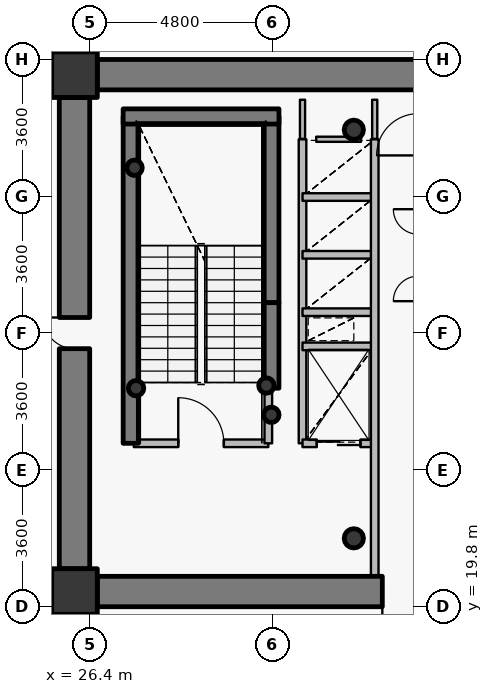
"""IFC4 building model, lengths in metres.
Left out: names, types, materials, properties, quantities, classifications, styles, units other than length and angle.
Written with IfcOpenShell. Run it as: python <this file> out.ifc"""

import sys

from ifc_helpers import new_model, si_unit, direction, frame, frame_2d, origin, origin_2d, place, context, subcontext, project, spatial, rectangle, hollow_circle, extrude, source, transform, mapped, element, fill, save


model = new_model("IFC4")
c1 = context("Model", 3, precision=1e-05, world=origin(), true_north=direction((0.0, 1.0)))
c2 = subcontext(c1, "Body", "Model", "MODEL_VIEW")
j1 = project(units=[si_unit("LENGTHUNIT", "METRE"), si_unit("PLANEANGLEUNIT", "RADIAN")], contexts=[c1])
p1 = place(None, origin())
s1 = spatial("IfcSite", under=j1, at=p1, CompositionType="ELEMENT")
p2 = place(p1, origin())
s2 = spatial("IfcBuilding", under=s1, at=p2, CompositionType="ELEMENT")
p3 = place(p2, frame((0.0, 0.0, 97.2)))
s3 = spatial("IfcBuildingStorey", under=s2, at=p3, CompositionType="ELEMENT", Elevation=97.2)
for number, where, z_axis, x_axis in (
    (1, (26.0, 20.2, 0.0), (0.0, 0.0, 1.0), (1.0, 0.0, 0.0)),
    (2, (26.0, 33.8, 0.0), (0.0, 0.0, 1.0), (1.0, 0.0, 0.0)),
):
    element("IfcColumn", number, at=place(p3, frame(where, z_axis=z_axis, x_axis=x_axis)), inside=s3, PredefinedType="COLUMN", context=c2, shape_type="SweptSolid", body=[
        extrude(rectangle(XDim=1.2, YDim=1.2, at=origin_2d()), origin(), (0.0, 0.0, 1.0), 3.75),
    ])
for number, where, z_axis, x_axis in (
    (3, (33.35, 21.6, 0.0), (0.0, 0.0, 1.0), (1.0, 0.0, 0.0)),
    (4, (33.35, 32.35, 0.0), (0.0, 0.0, 1.0), (1.0, 0.0, 0.0)),
):
    element("IfcColumn", number, at=place(p3, frame(where, z_axis=z_axis, x_axis=x_axis)), inside=s3, PredefinedType="COLUMN", context=c2, shape_type="SweptSolid", body=[
        extrude(hollow_circle(Radius=0.254, WallThickness=0.02, at=origin_2d()), origin(), (0.0, 0.0, 1.0), 3.75),
    ])
p4 = place(p3, frame((27.48, 24.1, 0.0), z_axis=(0.0, 0.0, 1.0), x_axis=(0.0, 1.0, 0.0)))
e5 = element("IfcWall", 5, at=p4, inside=s3, PredefinedType="SHEAR", context=c2, shape_type="SweptSolid", body=[
    extrude(rectangle(XDim=8.6, YDim=0.4, at=frame_2d((4.3, 0.0))), origin(), (0.0, 0.0, 1.0), 3.75),
])
p5 = place(p3, frame((31.18, 27.8, 0.0), z_axis=(0.0, 0.0, 1.0), x_axis=(0.0, 1.0, 0.0)))
e6 = element("IfcWall", 6, at=p5, inside=s3, PredefinedType="SHEAR", context=c2, shape_type="SweptSolid", body=[
    extrude(rectangle(XDim=4.9, YDim=0.4, at=frame_2d((2.45, 0.0))), origin(), (0.0, 0.0, 1.0), 3.75),
])
p6 = place(p3, frame((27.28, 32.7, 0.0), z_axis=(0.0, 0.0, 1.0), x_axis=(1.0, 0.0, 0.0)))
e7 = element("IfcWall", 7, at=p6, inside=s3, PredefinedType="SHEAR", context=c2, shape_type="SweptSolid", body=[
    extrude(rectangle(XDim=4.1, YDim=0.4, at=frame_2d((2.05, 0.0))), origin(), (0.0, 0.0, 1.0), 3.75),
])
for number, where, z_axis, x_axis in (
    (8, (27.58, 31.35, 0.0), (0.0, 0.0, 1.0), (1.0, 0.0, 0.0)),
    (9, (31.05, 25.62, 0.0), (0.0, 0.0, 1.0), (1.0, 0.0, 0.0)),
    (10, (31.18, 24.85, 0.0), (0.0, 0.0, 1.0), (1.0, 0.0, 0.0)),
    (11, (27.62, 25.55, 0.0), (0.0, 0.0, 1.0), (1.0, 0.0, 0.0)),
):
    element("IfcColumn", number, at=place(p3, frame(where, z_axis=z_axis, x_axis=x_axis)), inside=s3, PredefinedType="COLUMN", context=c2, shape_type="SweptSolid", body=[
        extrude(hollow_circle(Radius=0.203, WallThickness=0.016, at=origin_2d()), origin(), (0.0, 0.0, 1.0), 3.75),
    ])
p7 = place(p3, frame((26.6, 33.8, 0.0), z_axis=(0.0, 0.0, 1.0), x_axis=(1.0, 0.0, 0.0)))
e12 = element("IfcWall", 12, at=p7, inside=s3, PredefinedType="SHEAR", context=c2, shape_type="SweptSolid", body=[
    extrude(rectangle(XDim=18.8, YDim=0.8, at=frame_2d((9.4, 0.0))), origin(), (0.0, 0.0, 1.0), 2.95),
])
p8 = place(p3, frame((45.4, 20.2, 0.0), z_axis=(0.0, 0.0, 1.0), x_axis=(-1.0, 0.0, 0.0)))
e13 = element("IfcWall", 13, at=p8, inside=s3, PredefinedType="SHEAR", context=c2, shape_type="SweptSolid", body=[
    extrude(rectangle(XDim=18.8, YDim=0.8, at=frame_2d((9.4, 0.0))), origin(), (0.0, 0.0, 1.0), 2.95),
])
p9 = place(p8, frame((10.15, 0.0, 0.0)))
e14 = element("IfcOpeningElement", 14, at=p9, cuts=e13, PredefinedType="OPENING", context=c2, shape_type="SweptSolid", body=[
    extrude(rectangle(XDim=1.15, YDim=2.15, at=origin_2d()), frame((0.575, 0.41, 1.075), z_axis=(0.0, -1.0, 0.0), x_axis=(1.0, 0.0, 0.0)), (0.0, 0.0, 1.0), 0.82),
])
p10 = place(p3, frame((26.0, 20.8, 0.0), z_axis=(0.0, 0.0, 1.0), x_axis=(0.0, 1.0, 0.0)))
e15 = element("IfcWall", 15, at=p10, inside=s3, PredefinedType="SHEAR", context=c2, shape_type="SweptSolid", body=[
    extrude(rectangle(XDim=12.4, YDim=0.8, at=frame_2d((6.2, 0.0))), origin(), (0.0, 0.0, 1.0), 2.95),
])
p11 = place(p10, frame((5.79, 0.0, 0.0)))
e16 = element("IfcOpeningElement", 16, at=p11, cuts=e15, PredefinedType="OPENING", context=c2, shape_type="SweptSolid", body=[
    extrude(rectangle(XDim=0.82, YDim=2.1, at=origin_2d()), frame((0.41, 0.41, 1.05), z_axis=(0.0, -1.0, 0.0), x_axis=(1.0, 0.0, 0.0)), (0.0, 0.0, 1.0), 0.82),
])
p12 = place(p3, frame((31.18, 25.55, 0.0), z_axis=(0.0, 0.0, 1.0), x_axis=(0.0, 1.0, 0.0)))
e17 = element("IfcWall", 17, at=p12, inside=s3, PredefinedType="SHEAR", context=c2, shape_type="SweptSolid", body=[
    extrude(rectangle(XDim=2.25, YDim=0.4, at=frame_2d((1.125, 0.0))), origin(), (0.0, 0.0, 1.0), 3.1),
])
p13 = place(p3, frame((27.56, 24.1, 0.0), z_axis=(0.0, 0.0, 1.0), x_axis=(1.0, 0.0, 0.0)))
e18 = element("IfcWall", 18, at=p13, inside=s3, PredefinedType="PARTITIONING", context=c2, shape_type="SweptSolid", body=[
    extrude(rectangle(XDim=3.54, YDim=0.2, at=frame_2d((1.77, 0.0))), origin(), (0.0, 0.0, 1.0), 3.5),
])
p14 = place(p13, frame((1.17, 0.0, 0.0)))
e19 = element("IfcOpeningElement", 19, at=p14, cuts=e18, PredefinedType="OPENING", context=c2, shape_type="SweptSolid", body=[
    extrude(rectangle(XDim=1.2, YDim=2.15, at=origin_2d()), frame((0.6, 0.11, 1.075), z_axis=(0.0, -1.0, 0.0), x_axis=(1.0, 0.0, 0.0)), (0.0, 0.0, 1.0), 0.22),
])
p15 = place(p3, frame((31.1, 24.1, 0.0), z_axis=(0.0, 0.0, 1.0), x_axis=(0.0, 1.0, 0.0)))
e20 = element("IfcWall", 20, at=p15, inside=s3, PredefinedType="PARTITIONING", context=c2, shape_type="SweptSolid", body=[
    extrude(rectangle(XDim=1.44, YDim=0.2, at=frame_2d((0.72, 0.0))), origin(), (0.0, 0.0, 1.0), 3.5),
])
p16 = place(p3, frame((32.0, 24.1, 0.0), z_axis=(0.0, 0.0, 1.0), x_axis=(0.0, 1.0, 0.0)))
e21 = element("IfcWall", 21, at=p16, inside=s3, PredefinedType="PARTITIONING", context=c2, shape_type="SweptSolid", body=[
    extrude(rectangle(XDim=8.0, YDim=0.2, at=frame_2d((4.0, 0.0))), origin(), (0.0, 0.0, 1.0), 3.5),
])
p17 = place(p3, frame((32.0, 24.1, 0.0), z_axis=(0.0, 0.0, 1.0), x_axis=(1.0, 0.0, 0.0)))
e22 = element("IfcWall", 22, at=p17, inside=s3, PredefinedType="PARTITIONING", context=c2, shape_type="SweptSolid", body=[
    extrude(rectangle(XDim=1.9, YDim=0.2, at=frame_2d((0.95, 0.0))), origin(), (0.0, 0.0, 1.0), 3.085),
])
p18 = place(p17, frame((0.375, 0.0, 0.0)))
e23 = element("IfcOpeningElement", 23, at=p18, cuts=e22, PredefinedType="OPENING", context=c2, shape_type="SweptSolid", body=[
    extrude(rectangle(XDim=1.15, YDim=2.15, at=origin_2d()), frame((0.575, 0.11, 1.075), z_axis=(0.0, -1.0, 0.0), x_axis=(1.0, 0.0, 0.0)), (0.0, 0.0, 1.0), 0.22),
])
for number, where, z_axis, x_axis in (
    (24, (32.0, 26.65, 0.0), (0.0, 0.0, 1.0), (1.0, 0.0, 0.0)),
    (25, (32.0, 27.55, 0.0), (0.0, 0.0, 1.0), (1.0, 0.0, 0.0)),
    (26, (32.0, 29.06, 0.0), (0.0, 0.0, 1.0), (1.0, 0.0, 0.0)),
    (27, (32.0, 30.58, 0.0), (0.0, 0.0, 1.0), (1.0, 0.0, 0.0)),
):
    element("IfcWall", number, at=place(p3, frame(where, z_axis=z_axis, x_axis=x_axis)), inside=s3, PredefinedType="PARTITIONING", context=c2, shape_type="SweptSolid", body=[
        extrude(rectangle(XDim=1.9, YDim=0.2, at=frame_2d((0.95, 0.0))), origin(), (0.0, 0.0, 1.0), 3.085),
    ])
p19 = place(p3, frame((33.9, 20.6, 0.0), z_axis=(0.0, 0.0, 1.0), x_axis=(0.0, 1.0, 0.0)))
e28 = element("IfcWall", 28, at=p19, inside=s3, PredefinedType="PARTITIONING", context=c2, shape_type="SweptSolid", body=[
    extrude(rectangle(XDim=11.5, YDim=0.2, at=frame_2d((5.75, 0.0))), origin(), (0.0, 0.0, 1.0), 3.085),
])
p20 = place(p3, frame((32.36, 32.1, 0.0), z_axis=(0.0, 0.0, 1.0), x_axis=(1.0, 0.0, 0.0)))
e29 = element("IfcWall", 29, at=p20, inside=s3, PredefinedType="PARTITIONING", context=c2, shape_type="SweptSolid", body=[
    extrude(rectangle(XDim=1.18, YDim=0.135, at=frame_2d((0.59, 0.0))), origin(), (0.0, 0.0, 1.0), 3.085),
])
p21 = place(p3, frame((32.0, 33.14, 0.0), z_axis=(0.0, 0.0, 1.0), x_axis=(0.0, -1.0, 0.0)))
e30 = element("IfcWall", 30, at=p21, inside=s3, PredefinedType="PARTITIONING", context=c2, shape_type="SweptSolid", body=[
    extrude(rectangle(XDim=1.03, YDim=0.135, at=frame_2d((0.515, 0.0))), origin(), (0.0, 0.0, 1.0), 3.035),
])
p22 = place(p3, frame((33.9, 32.11, 0.0), z_axis=(0.0, 0.0, 1.0), x_axis=(0.0, 1.0, 0.0)))
e31 = element("IfcWall", 31, at=p22, inside=s3, PredefinedType="PARTITIONING", context=c2, shape_type="SweptSolid", body=[
    extrude(rectangle(XDim=1.03, YDim=0.135, at=frame_2d((0.515, 0.0))), origin(), (0.0, 0.0, 1.0), 3.085),
])
p23 = place(p3, frame((26.59, 34.2, 0.0), z_axis=(0.0, 0.0, 1.0), x_axis=(-1.0, 0.0, 0.0)))
e32 = element("IfcWall", 32, at=p23, inside=s3, PredefinedType="PARTITIONING", context=c2, shape_type="SweptSolid", body=[
    extrude(rectangle(XDim=0.99, YDim=0.135, at=frame_2d((0.495, 0.0))), origin(), (0.0, 0.0, 1.0), 2.935),
])
p24 = place(p3, frame((25.6, 33.893, 0.0), z_axis=(0.0, 0.0, 1.0), x_axis=(0.0, -1.0, 0.0)))
e33 = element("IfcWall", 33, at=p24, inside=s3, PredefinedType="PARTITIONING", context=c2, shape_type="SweptSolid", body=[
    extrude(rectangle(XDim=0.683, YDim=0.135, at=frame_2d((0.341, 0.0))), origin(), (0.0, 0.0, 1.0), 3.5),
])
p25 = place(p3, frame((25.6, 20.79, 0.0), z_axis=(0.0, 0.0, 1.0), x_axis=(0.0, -1.0, 0.0)))
e34 = element("IfcWall", 34, at=p25, inside=s3, PredefinedType="PARTITIONING", context=c2, shape_type="SweptSolid", body=[
    extrude(rectangle(XDim=0.99, YDim=0.135, at=frame_2d((0.495, 0.0))), origin(), (0.0, 0.0, 1.0), 3.5),
])
p26 = place(p3, frame((25.907, 19.8, 0.0), z_axis=(0.0, 0.0, 1.0), x_axis=(1.0, 0.0, 0.0)))
e35 = element("IfcWall", 35, at=p26, inside=s3, PredefinedType="PARTITIONING", context=c2, shape_type="SweptSolid", body=[
    extrude(rectangle(XDim=0.683, YDim=0.135, at=frame_2d((0.341, 0.0))), origin(), (0.0, 0.0, 1.0), 2.935),
])
m1 = source(origin(), c2, "Body", "SweptSolid", [
    extrude(rectangle(XDim=0.82, YDim=2.1, at=origin_2d()), frame((0.41, 0.025, 1.05), z_axis=(0.0, -1.0, 0.0), x_axis=(1.0, 0.0, 0.0)), (0.0, 0.0, 1.0), 0.05),
])
p27 = place(p11, origin())
e36 = element("IfcDoor", 36, at=p27, inside=s3, OperationType="SINGLE_SWING_RIGHT", PredefinedType="DOOR", context=c2, shape_type="MappedRepresentation", body=[
    mapped(m1, transform((0.0, 0.0, 0.0), x_axis=(1.0, 0.0, 0.0), y_axis=(0.0, 1.0, 0.0), z_axis=(0.0, 0.0, 1.0), scale=1.0)),
])
fill(e16, e36)
m2 = source(origin(), c2, "Body", "SweptSolid", [
    extrude(rectangle(XDim=1.15, YDim=2.15, at=origin_2d()), frame((0.575, 0.025, 1.075), z_axis=(0.0, -1.0, 0.0), x_axis=(1.0, 0.0, 0.0)), (0.0, 0.0, 1.0), 0.05),
])
p28 = place(p9, origin())
e37 = element("IfcDoor", 37, at=p28, inside=s3, OperationType="SINGLE_SWING_RIGHT", PredefinedType="DOOR", context=c2, shape_type="MappedRepresentation", body=[
    mapped(m2, transform((0.0, 0.0, 0.0), x_axis=(1.0, 0.0, 0.0), y_axis=(0.0, 1.0, 0.0), z_axis=(0.0, 0.0, 1.0), scale=1.0)),
])
fill(e14, e37)
m3 = source(origin(), c2, "Body", "SweptSolid", [
    extrude(rectangle(XDim=1.2, YDim=2.15, at=origin_2d()), frame((0.6, 0.025, 1.075), z_axis=(0.0, -1.0, 0.0), x_axis=(1.0, 0.0, 0.0)), (0.0, 0.0, 1.0), 0.05),
])
p29 = place(p14, origin())
e38 = element("IfcDoor", 38, at=p29, inside=s3, OperationType="SINGLE_SWING_LEFT", PredefinedType="DOOR", context=c2, shape_type="MappedRepresentation", body=[
    mapped(m3, transform((0.0, 0.0, 0.0), x_axis=(1.0, 0.0, 0.0), y_axis=(0.0, 1.0, 0.0), z_axis=(0.0, 0.0, 1.0), scale=1.0)),
])
fill(e19, e38)
m4 = source(origin(), c2, "Body", "SweptSolid", [
    extrude(rectangle(XDim=1.15, YDim=2.15, at=origin_2d()), frame((0.575, 0.025, 1.075), z_axis=(0.0, -1.0, 0.0), x_axis=(1.0, 0.0, 0.0)), (0.0, 0.0, 1.0), 0.05),
])
p30 = place(p18, origin())
e39 = element("IfcDoor", 39, at=p30, inside=s3, OperationType="DOUBLE_DOOR_SLIDING", PredefinedType="USERDEFINED", context=c2, shape_type="MappedRepresentation", body=[
    mapped(m4, transform((0.0, 0.0, 0.0), x_axis=(1.0, 0.0, 0.0), y_axis=(0.0, 1.0, 0.0), z_axis=(0.0, 0.0, 1.0), scale=1.0)),
])
fill(e23, e39)
save(model, sys.argv[1])
